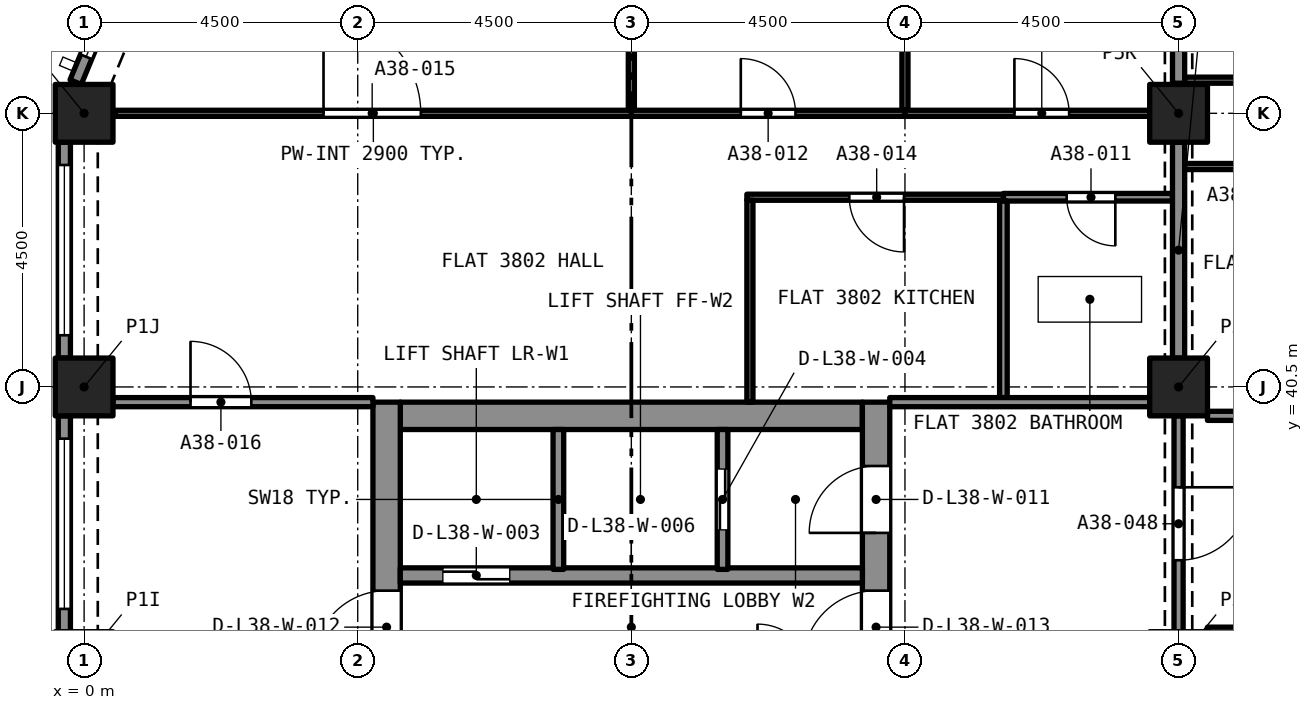
"""IFC4 building model, lengths in metres.
Left out: names, types, materials, properties, quantities, classifications, styles, units other than length and angle.
Written with IfcOpenShell. Run it as: python <this file> out.ifc"""

import sys

from ifc_helpers import new_model, si_unit, direction, frame, frame_2d, origin, origin_2d, place, context, subcontext, project, spatial, rectangle, extrude, element, fill, save


model = new_model("IFC4")
c1 = context("Model", 3, precision=1e-05, world=origin(), true_north=direction((0.0, 1.0)))
c2 = subcontext(c1, "Body", "Model", "MODEL_VIEW")
j1 = project(units=[si_unit("LENGTHUNIT", "METRE"), si_unit("PLANEANGLEUNIT", "RADIAN")], contexts=[c1])
p1 = place(None, origin())
s1 = spatial("IfcSite", under=j1, at=p1, CompositionType="ELEMENT")
p2 = place(p1, origin())
s2 = spatial("IfcBuilding", under=s1, at=p2, CompositionType="ELEMENT")
p3 = place(p2, frame((0.0, 0.0, 136.6)))
s3 = spatial("IfcBuildingStorey", under=s2, at=p3, CompositionType="ELEMENT", Elevation=136.6)
for number, where, z_axis, x_axis in (
    (1, (0.0, 40.5, 0.0), (0.0, 0.0, 1.0), (1.0, 0.0, 0.0)),
    (2, (18.0, 40.5, 0.0), (0.0, 0.0, 1.0), (1.0, 0.0, 0.0)),
    (3, (0.0, 45.0, 0.0), (0.0, 0.0, 1.0), (1.0, 0.0, 0.0)),
    (4, (18.0, 45.0, 0.0), (0.0, 0.0, 1.0), (1.0, 0.0, 0.0)),
):
    element("IfcColumn", number, at=place(p3, frame(where, z_axis=z_axis, x_axis=x_axis)), inside=s3, PredefinedType="COLUMN", context=c2, shape_type="SweptSolid", body=[
        extrude(rectangle(XDim=0.95, YDim=0.95, at=origin_2d()), origin(), (0.0, 0.0, 1.0), 3.2),
    ])
p4 = place(p3, frame((5.2, 40.025, 0.0), z_axis=(0.0, 0.0, 1.0), x_axis=(1.0, 0.0, 0.0)))
e5 = element("IfcWall", 5, at=p4, inside=s3, PredefinedType="SOLIDWALL", context=c2, shape_type="SweptSolid", body=[
    extrude(rectangle(XDim=7.6, YDim=0.45, at=frame_2d((3.8, 0.0))), origin(), (0.0, 0.0, 1.0), 3.2),
])
p5 = place(p3, frame((4.975, 27.25, 0.0), z_axis=(0.0, 0.0, 1.0), x_axis=(0.0, 1.0, 0.0)))
e6 = element("IfcWall", 6, at=p5, inside=s3, PredefinedType="SOLIDWALL", context=c2, shape_type="SweptSolid", body=[
    extrude(rectangle(XDim=13.0, YDim=0.45, at=frame_2d((6.5, 0.0))), origin(), (0.0, 0.0, 1.0), 3.2),
])
p6 = place(p5, frame((8.7, 0.0, 0.0)))
e7 = element("IfcOpeningElement", 7, at=p6, cuts=e6, PredefinedType="OPENING", context=c2, shape_type="SweptSolid", body=[
    extrude(rectangle(XDim=1.2, YDim=2.1, at=frame_2d((0.6, 1.05))), frame((0.0, 0.235, 0.0), z_axis=(0.0, -1.0, 0.0), x_axis=(1.0, 0.0, 0.0)), (0.0, 0.0, 1.0), 0.47),
])
p7 = place(p3, frame((13.025, 27.25, 0.0), z_axis=(0.0, 0.0, 1.0), x_axis=(0.0, 1.0, 0.0)))
e8 = element("IfcWall", 8, at=p7, inside=s3, PredefinedType="SOLIDWALL", context=c2, shape_type="SweptSolid", body=[
    extrude(rectangle(XDim=13.0, YDim=0.45, at=frame_2d((6.5, 0.0))), origin(), (0.0, 0.0, 1.0), 3.2),
])
p8 = place(p7, frame((10.85, 0.0, 0.0)))
e9 = element("IfcOpeningElement", 9, at=p8, cuts=e8, PredefinedType="OPENING", context=c2, shape_type="SweptSolid", body=[
    extrude(rectangle(XDim=1.1, YDim=2.1, at=frame_2d((0.55, 1.05))), frame((0.0, 0.235, 0.0), z_axis=(0.0, -1.0, 0.0), x_axis=(1.0, 0.0, 0.0)), (0.0, 0.0, 1.0), 0.47),
])
p9 = place(p7, frame((8.7, 0.0, 0.0)))
e10 = element("IfcOpeningElement", 10, at=p9, cuts=e8, PredefinedType="OPENING", context=c2, shape_type="SweptSolid", body=[
    extrude(rectangle(XDim=1.2, YDim=2.1, at=frame_2d((0.6, 1.05))), frame((0.0, 0.235, 0.0), z_axis=(0.0, -1.0, 0.0), x_axis=(1.0, 0.0, 0.0)), (0.0, 0.0, 1.0), 0.47),
])
p10 = place(p3, frame((-0.139, 45.513, 0.0), z_axis=(0.0, 0.0, 1.0), x_axis=(0.382680855588, 0.923880599843, 0.0)))
e11 = element("IfcWall", 11, at=p10, inside=s3, PredefinedType="SOLIDWALL", context=c2, shape_type="SweptSolid", body=[
    extrude(rectangle(XDim=2.403, YDim=0.2, at=frame_2d((1.201, 0.0))), origin(), (0.0, 0.0, 1.0), 3.2),
])
p11 = place(p10, frame((0.451, 0.0, 0.45)))
e12 = element("IfcOpeningElement", 12, at=p11, cuts=e11, PredefinedType="OPENING", context=c2, shape_type="SweptSolid", body=[
    extrude(rectangle(XDim=1.7, YDim=1.95, at=frame_2d((0.85, 0.975))), frame((0.0, 0.11, 0.0), z_axis=(0.0, -1.0, 0.0), x_axis=(1.0, 0.0, 0.0)), (0.0, 0.0, 1.0), 0.22),
])
p12 = place(p3, frame((-0.325, 40.975, 0.0), z_axis=(0.0, 0.0, 1.0), x_axis=(0.0, 1.0, 0.0)))
e13 = element("IfcWall", 13, at=p12, inside=s3, PredefinedType="SOLIDWALL", context=c2, shape_type="SweptSolid", body=[
    extrude(rectangle(XDim=3.55, YDim=0.2, at=frame_2d((1.775, 0.0))), origin(), (0.0, 0.0, 1.0), 3.2),
])
p13 = place(p12, frame((0.375, 0.0, 0.45)))
e14 = element("IfcOpeningElement", 14, at=p13, cuts=e13, PredefinedType="OPENING", context=c2, shape_type="SweptSolid", body=[
    extrude(rectangle(XDim=2.8, YDim=1.95, at=frame_2d((1.4, 0.975))), frame((0.0, 0.11, 0.0), z_axis=(0.0, -1.0, 0.0), x_axis=(1.0, 0.0, 0.0)), (0.0, 0.0, 1.0), 0.22),
])
p14 = place(p3, frame((-0.325, 36.475, 0.0), z_axis=(0.0, 0.0, 1.0), x_axis=(0.0, 1.0, 0.0)))
e15 = element("IfcWall", 15, at=p14, inside=s3, PredefinedType="SOLIDWALL", context=c2, shape_type="SweptSolid", body=[
    extrude(rectangle(XDim=3.55, YDim=0.2, at=frame_2d((1.775, 0.0))), origin(), (0.0, 0.0, 1.0), 3.2),
])
p15 = place(p14, frame((0.375, 0.0, 0.45)))
e16 = element("IfcOpeningElement", 16, at=p15, cuts=e15, PredefinedType="OPENING", context=c2, shape_type="SweptSolid", body=[
    extrude(rectangle(XDim=2.8, YDim=1.95, at=frame_2d((1.4, 0.975))), frame((0.0, 0.11, 0.0), z_axis=(0.0, -1.0, 0.0), x_axis=(1.0, 0.0, 0.0)), (0.0, 0.0, 1.0), 0.22),
])
p16 = place(p3, frame((17.9, 43.62, 0.0), z_axis=(0.0, 0.0, 1.0), x_axis=(-1.0, 0.0, 0.0)))
e17 = element("IfcWall", 17, at=p16, inside=s3, PredefinedType="PARTITIONING", context=c2, shape_type="SweptSolid", body=[
    extrude(rectangle(XDim=2.781, YDim=0.125, at=frame_2d((1.39, 0.0))), origin(), (0.0, 0.0, 1.0), 2.9),
])
p17 = place(p16, frame((0.94, 0.0, 0.0)))
e18 = element("IfcOpeningElement", 18, at=p17, cuts=e17, PredefinedType="OPENING", context=c2, shape_type="SweptSolid", body=[
    extrude(rectangle(XDim=0.8, YDim=2.1, at=frame_2d((0.4, 1.05))), frame((0.0, 0.073, 0.0), z_axis=(0.0, -1.0, 0.0), x_axis=(1.0, 0.0, 0.0)), (0.0, 0.0, 1.0), 0.145),
])
p18 = place(p3, frame((15.119, 40.325, 0.0), z_axis=(0.0, 0.0, 1.0), x_axis=(0.0, 1.0, 0.0)))
e19 = element("IfcWall", 19, at=p18, inside=s3, PredefinedType="PARTITIONING", context=c2, shape_type="SweptSolid", body=[
    extrude(rectangle(XDim=3.233, YDim=0.125, at=frame_2d((1.616, 0.0))), origin(), (0.0, 0.0, 1.0), 2.9),
])
p19 = place(p3, frame((18.0, 40.975, 0.0), z_axis=(0.0, 0.0, 1.0), x_axis=(0.0, 1.0, 0.0)))
e20 = element("IfcWall", 20, at=p19, inside=s3, PredefinedType="PARTITIONING", context=c2, shape_type="SweptSolid", body=[
    extrude(rectangle(XDim=3.55, YDim=0.2, at=frame_2d((1.775, 0.0))), origin(), (0.0, 0.0, 1.0), 2.38),
])
p20 = place(p3, frame((13.5, 45.05, 0.0), z_axis=(0.0, 0.0, 1.0), x_axis=(0.0, 1.0, 0.0)))
e21 = element("IfcWall", 21, at=p20, inside=s3, PredefinedType="PARTITIONING", context=c2, shape_type="SweptSolid", body=[
    extrude(rectangle(XDim=3.975, YDim=0.1, at=frame_2d((1.987, 0.0))), origin(), (0.0, 0.0, 1.0), 2.9),
])
p21 = place(p3, frame((9.0, 45.0, 0.0), z_axis=(0.0, 0.0, 1.0), x_axis=(1.0, 0.0, 0.0)))
e22 = element("IfcWall", 22, at=p21, inside=s3, PredefinedType="PARTITIONING", context=c2, shape_type="SweptSolid", body=[
    extrude(rectangle(XDim=4.5, YDim=0.1, at=frame_2d((2.25, 0.0))), origin(), (0.0, 0.0, 1.0), 2.9),
])
p22 = place(p21, frame((1.8, 0.0, 0.0)))
e23 = element("IfcOpeningElement", 23, at=p22, cuts=e22, PredefinedType="OPENING", context=c2, shape_type="SweptSolid", body=[
    extrude(rectangle(XDim=0.9, YDim=2.1, at=frame_2d((0.45, 1.05))), frame((0.0, 0.06, 0.0), z_axis=(0.0, -1.0, 0.0), x_axis=(1.0, 0.0, 0.0)), (0.0, 0.0, 1.0), 0.12),
])
p23 = place(p3, frame((9.0, 45.05, 0.0), z_axis=(0.0, 0.0, 1.0), x_axis=(0.0, 1.0, 0.0)))
e24 = element("IfcWall", 24, at=p23, inside=s3, PredefinedType="PARTITIONING", context=c2, shape_type="SweptSolid", body=[
    extrude(rectangle(XDim=3.975, YDim=0.1, at=frame_2d((1.987, 0.0))), origin(), (0.0, 0.0, 1.0), 2.9),
])
p24 = place(p3, frame((13.5, 45.0, 0.0), z_axis=(0.0, 0.0, 1.0), x_axis=(1.0, 0.0, 0.0)))
e25 = element("IfcWall", 25, at=p24, inside=s3, PredefinedType="PARTITIONING", context=c2, shape_type="SweptSolid", body=[
    extrude(rectangle(XDim=4.025, YDim=0.1, at=frame_2d((2.012, 0.0))), origin(), (0.0, 0.0, 1.0), 2.9),
])
p25 = place(p24, frame((1.8, 0.0, 0.0)))
e26 = element("IfcOpeningElement", 26, at=p25, cuts=e25, PredefinedType="OPENING", context=c2, shape_type="SweptSolid", body=[
    extrude(rectangle(XDim=0.9, YDim=2.1, at=frame_2d((0.45, 1.05))), frame((0.0, 0.06, 0.0), z_axis=(0.0, -1.0, 0.0), x_axis=(1.0, 0.0, 0.0)), (0.0, 0.0, 1.0), 0.12),
])
p26 = place(p3, frame((18.0, 45.495, 0.0), z_axis=(0.0, 0.0, 1.0), x_axis=(0.0, 1.0, 0.0)))
e27 = element("IfcWall", 27, at=p26, inside=s3, PredefinedType="PARTITIONING", context=c2, shape_type="SweptSolid", body=[
    extrude(rectangle(XDim=3.53, YDim=0.2, at=frame_2d((1.765, 0.0))), origin(), (0.0, 0.0, 1.0), 2.38),
])
p27 = place(p3, frame((15.119, 43.62, 0.0), z_axis=(0.0, 0.0, 1.0), x_axis=(-1.0, 0.0, 0.0)))
e28 = element("IfcWall", 28, at=p27, inside=s3, PredefinedType="PARTITIONING", context=c2, shape_type="SweptSolid", body=[
    extrude(rectangle(XDim=4.219, YDim=0.1, at=frame_2d((2.11, 0.0))), origin(), (0.0, 0.0, 1.0), 2.9),
])
p28 = place(p27, frame((1.635, 0.0, 0.0)))
e29 = element("IfcOpeningElement", 29, at=p28, cuts=e28, PredefinedType="OPENING", context=c2, shape_type="SweptSolid", body=[
    extrude(rectangle(XDim=0.9, YDim=2.1, at=frame_2d((0.45, 1.05))), frame((0.0, 0.06, 0.0), z_axis=(0.0, -1.0, 0.0), x_axis=(1.0, 0.0, 0.0)), (0.0, 0.0, 1.0), 0.12),
])
p29 = place(p3, frame((10.95, 40.25, 0.0), z_axis=(0.0, 0.0, 1.0), x_axis=(0.0, 1.0, 0.0)))
e30 = element("IfcWall", 30, at=p29, inside=s3, PredefinedType="PARTITIONING", context=c2, shape_type="SweptSolid", body=[
    extrude(rectangle(XDim=3.32, YDim=0.1, at=frame_2d((1.66, 0.0))), origin(), (0.0, 0.0, 1.0), 2.9),
])
p30 = place(p3, frame((0.514, 45.0, 0.0), z_axis=(0.0, 0.0, 1.0), x_axis=(1.0, 0.0, 0.0)))
e31 = element("IfcWall", 31, at=p30, inside=s3, PredefinedType="PARTITIONING", context=c2, shape_type="SweptSolid", body=[
    extrude(rectangle(XDim=8.486, YDim=0.1, at=frame_2d((4.243, 0.0))), origin(), (0.0, 0.0, 1.0), 2.9),
])
p31 = place(p30, frame((3.423, 0.0, 0.0)))
e32 = element("IfcOpeningElement", 32, at=p31, cuts=e31, PredefinedType="OPENING", context=c2, shape_type="SweptSolid", body=[
    extrude(rectangle(XDim=1.6, YDim=2.1, at=frame_2d((0.8, 1.05))), frame((0.0, 0.06, 0.0), z_axis=(0.0, -1.0, 0.0), x_axis=(1.0, 0.0, 0.0)), (0.0, 0.0, 1.0), 0.12),
])
p32 = place(p3, frame((0.475, 40.25, 0.0), z_axis=(0.0, 0.0, 1.0), x_axis=(1.0, 0.0, 0.0)))
e33 = element("IfcWall", 33, at=p32, inside=s3, PredefinedType="PARTITIONING", context=c2, shape_type="SweptSolid", body=[
    extrude(rectangle(XDim=4.275, YDim=0.15, at=frame_2d((2.137, 0.0))), origin(), (0.0, 0.0, 1.0), 2.9),
])
p33 = place(p32, frame((1.275, 0.0, 0.0)))
e34 = element("IfcOpeningElement", 34, at=p33, cuts=e33, PredefinedType="OPENING", context=c2, shape_type="SweptSolid", body=[
    extrude(rectangle(XDim=1.0, YDim=2.1, at=frame_2d((0.5, 1.05))), frame((0.0, 0.085, 0.0), z_axis=(0.0, -1.0, 0.0), x_axis=(1.0, 0.0, 0.0)), (0.0, 0.0, 1.0), 0.17),
])
p34 = place(p3, frame((13.25, 40.25, 0.0), z_axis=(0.0, 0.0, 1.0), x_axis=(1.0, 0.0, 0.0)))
e35 = element("IfcWall", 35, at=p34, inside=s3, PredefinedType="PARTITIONING", context=c2, shape_type="SweptSolid", body=[
    extrude(rectangle(XDim=4.275, YDim=0.15, at=frame_2d((2.137, 0.0))), origin(), (0.0, 0.0, 1.0), 2.9),
])
p35 = place(p3, frame((21.24, 44.125, 0.0), z_axis=(0.0, 0.0, 1.0), x_axis=(-1.0, 0.0, 0.0)))
e36 = element("IfcWall", 36, at=p35, inside=s3, PredefinedType="PARTITIONING", context=c2, shape_type="SweptSolid", body=[
    extrude(rectangle(XDim=3.14, YDim=0.1, at=frame_2d((1.57, 0.0))), origin(), (0.0, 0.0, 1.0), 2.75),
])
p36 = place(p35, frame((1.17, 0.0, 0.0)))
e37 = element("IfcOpeningElement", 37, at=p36, cuts=e36, PredefinedType="OPENING", context=c2, shape_type="SweptSolid", body=[
    extrude(rectangle(XDim=0.9, YDim=2.1, at=frame_2d((0.45, 1.05))), frame((0.0, 0.06, 0.0), z_axis=(0.0, -1.0, 0.0), x_axis=(1.0, 0.0, 0.0)), (0.0, 0.0, 1.0), 0.12),
])
p37 = place(p3, frame((18.1, 45.545, 0.0), z_axis=(0.0, 0.0, 1.0), x_axis=(1.0, 0.0, 0.0)))
e38 = element("IfcWall", 38, at=p37, inside=s3, PredefinedType="PARTITIONING", context=c2, shape_type="SweptSolid", body=[
    extrude(rectangle(XDim=4.4, YDim=0.1, at=frame_2d((2.2, 0.0))), origin(), (0.0, 0.0, 1.0), 2.75),
])
p38 = place(p37, frame((1.65, 0.0, 0.0)))
e39 = element("IfcOpeningElement", 39, at=p38, cuts=e38, PredefinedType="OPENING", context=c2, shape_type="SweptSolid", body=[
    extrude(rectangle(XDim=1.0, YDim=2.1, at=frame_2d((0.5, 1.05))), frame((0.0, 0.06, 0.0), z_axis=(0.0, -1.0, 0.0), x_axis=(1.0, 0.0, 0.0)), (0.0, 0.0, 1.0), 0.12),
])
p39 = place(p3, frame((18.475, 40.025, 0.0), z_axis=(0.0, 0.0, 1.0), x_axis=(1.0, 0.0, 0.0)))
e40 = element("IfcWall", 40, at=p39, inside=s3, PredefinedType="PARTITIONING", context=c2, shape_type="SweptSolid", body=[
    extrude(rectangle(XDim=9.05, YDim=0.15, at=frame_2d((4.525, 0.0))), origin(), (0.0, 0.0, 1.0), 2.75),
])
p40 = place(p3, frame((31.025, 36.475, 0.0), z_axis=(0.0, 0.0, 1.0), x_axis=(-1.0, 0.0, 0.0)))
e41 = element("IfcWall", 41, at=p40, inside=s3, PredefinedType="PARTITIONING", context=c2, shape_type="SweptSolid", body=[
    extrude(rectangle(XDim=12.55, YDim=0.15, at=frame_2d((6.275, 0.0))), origin(), (0.0, 0.0, 1.0), 2.75),
])
p41 = place(p40, frame((5.775, 0.0, 0.0)))
e42 = element("IfcOpeningElement", 42, at=p41, cuts=e41, PredefinedType="OPENING", context=c2, shape_type="SweptSolid", body=[
    extrude(rectangle(XDim=1.0, YDim=2.1, at=frame_2d((0.5, 1.05))), frame((0.0, 0.085, 0.0), z_axis=(0.0, -1.0, 0.0), x_axis=(1.0, 0.0, 0.0)), (0.0, 0.0, 1.0), 0.17),
])
p42 = place(p3, frame((18.0, 40.025, 0.0), z_axis=(0.0, 0.0, 1.0), x_axis=(0.0, -1.0, 0.0)))
e43 = element("IfcWall", 43, at=p42, inside=s3, PredefinedType="PARTITIONING", context=c2, shape_type="SweptSolid", body=[
    extrude(rectangle(XDim=3.55, YDim=0.15, at=frame_2d((1.775, 0.0))), origin(), (0.0, 0.0, 1.0), 2.38),
])
p43 = place(p42, frame((1.175, 0.0, 0.0)))
e44 = element("IfcOpeningElement", 44, at=p43, cuts=e43, PredefinedType="OPENING", context=c2, shape_type="SweptSolid", body=[
    extrude(rectangle(XDim=1.2, YDim=2.1, at=frame_2d((0.6, 1.05))), frame((0.0, 0.085, 0.0), z_axis=(0.0, -1.0, 0.0), x_axis=(1.0, 0.0, 0.0)), (0.0, 0.0, 1.0), 0.17),
])
p44 = place(p3, frame((5.2, 37.4, 0.0), z_axis=(0.0, 0.0, 1.0), x_axis=(1.0, 0.0, 0.0)))
e45 = element("IfcWall", 45, at=p44, inside=s3, PredefinedType="SOLIDWALL", context=c2, shape_type="SweptSolid", body=[
    extrude(rectangle(XDim=7.6, YDim=0.25, at=frame_2d((3.8, 0.0))), origin(), (0.0, 0.0, 1.0), 2.9),
])
p45 = place(p44, frame((0.7, 0.0, 0.0)))
e46 = element("IfcOpeningElement", 46, at=p45, cuts=e45, PredefinedType="OPENING", context=c2, shape_type="SweptSolid", body=[
    extrude(rectangle(XDim=1.1, YDim=2.4, at=frame_2d((0.55, 1.2))), frame((0.0, 0.135, 0.0), z_axis=(0.0, -1.0, 0.0), x_axis=(1.0, 0.0, 0.0)), (0.0, 0.0, 1.0), 0.27),
])
p46 = place(p3, frame((7.8, 37.5, 0.0), z_axis=(0.0, 0.0, 1.0), x_axis=(0.0, 1.0, 0.0)))
e47 = element("IfcWall", 47, at=p46, inside=s3, PredefinedType="SOLIDWALL", context=c2, shape_type="SweptSolid", body=[
    extrude(rectangle(XDim=2.3, YDim=0.175, at=frame_2d((1.15, 0.0))), origin(), (0.0, 0.0, 1.0), 2.9),
])
p47 = place(p3, frame((10.5, 37.5, 0.0), z_axis=(0.0, 0.0, 1.0), x_axis=(0.0, 1.0, 0.0)))
e48 = element("IfcWall", 48, at=p47, inside=s3, PredefinedType="SOLIDWALL", context=c2, shape_type="SweptSolid", body=[
    extrude(rectangle(XDim=2.3, YDim=0.175, at=frame_2d((1.15, 0.0))), origin(), (0.0, 0.0, 1.0), 2.9),
])
p48 = place(p47, frame((0.65, 0.0, 0.0)))
e49 = element("IfcOpeningElement", 49, at=p48, cuts=e48, PredefinedType="OPENING", context=c2, shape_type="SweptSolid", body=[
    extrude(rectangle(XDim=1.0, YDim=2.1, at=frame_2d((0.5, 1.05))), frame((0.0, 0.097, 0.0), z_axis=(0.0, -1.0, 0.0), x_axis=(1.0, 0.0, 0.0)), (0.0, 0.0, 1.0), 0.195),
])
p49 = place(p11, origin())
e50 = element("IfcWindow", 50, at=p49, inside=s3, PartitioningType="SINGLE_PANEL", PredefinedType="WINDOW", context=c2, shape_type="SweptSolid", body=[
    extrude(rectangle(XDim=1.7, YDim=1.95, at=frame_2d((0.85, 0.975))), frame((0.0, 0.03, 0.0), z_axis=(0.0, -1.0, 0.0), x_axis=(1.0, 0.0, 0.0)), (0.0, 0.0, 1.0), 0.06),
])
fill(e12, e50)
p50 = place(p13, origin())
e51 = element("IfcWindow", 51, at=p50, inside=s3, PartitioningType="SINGLE_PANEL", PredefinedType="WINDOW", context=c2, shape_type="SweptSolid", body=[
    extrude(rectangle(XDim=2.8, YDim=1.95, at=frame_2d((1.4, 0.975))), frame((0.0, 0.03, 0.0), z_axis=(0.0, -1.0, 0.0), x_axis=(1.0, 0.0, 0.0)), (0.0, 0.0, 1.0), 0.06),
])
fill(e14, e51)
p51 = place(p15, origin())
e52 = element("IfcWindow", 52, at=p51, inside=s3, PartitioningType="SINGLE_PANEL", PredefinedType="WINDOW", context=c2, shape_type="SweptSolid", body=[
    extrude(rectangle(XDim=2.8, YDim=1.95, at=frame_2d((1.4, 0.975))), frame((0.0, 0.03, 0.0), z_axis=(0.0, -1.0, 0.0), x_axis=(1.0, 0.0, 0.0)), (0.0, 0.0, 1.0), 0.06),
])
fill(e16, e52)
p52 = place(p17, origin())
e53 = element("IfcDoor", 53, at=p52, inside=s3, OperationType="SINGLE_SWING_LEFT", PredefinedType="DOOR", context=c2, shape_type="SweptSolid", body=[
    extrude(rectangle(XDim=0.8, YDim=2.1, at=frame_2d((0.4, 1.05))), frame((0.0, 0.025, 0.0), z_axis=(0.0, -1.0, 0.0), x_axis=(1.0, 0.0, 0.0)), (0.0, 0.0, 1.0), 0.05),
])
fill(e18, e53)
p53 = place(p22, origin())
e54 = element("IfcDoor", 54, at=p53, inside=s3, OperationType="SINGLE_SWING_LEFT", PredefinedType="DOOR", context=c2, shape_type="SweptSolid", body=[
    extrude(rectangle(XDim=0.9, YDim=2.1, at=frame_2d((0.45, 1.05))), frame((0.0, 0.025, 0.0), z_axis=(0.0, -1.0, 0.0), x_axis=(1.0, 0.0, 0.0)), (0.0, 0.0, 1.0), 0.05),
])
fill(e23, e54)
p54 = place(p25, origin())
e55 = element("IfcDoor", 55, at=p54, inside=s3, OperationType="SINGLE_SWING_RIGHT", PredefinedType="DOOR", context=c2, shape_type="SweptSolid", body=[
    extrude(rectangle(XDim=0.9, YDim=2.1, at=frame_2d((0.45, 1.05))), frame((0.0, 0.025, 0.0), z_axis=(0.0, -1.0, 0.0), x_axis=(1.0, 0.0, 0.0)), (0.0, 0.0, 1.0), 0.05),
])
fill(e26, e55)
p55 = place(p28, origin())
e56 = element("IfcDoor", 56, at=p55, inside=s3, OperationType="SINGLE_SWING_LEFT", PredefinedType="DOOR", context=c2, shape_type="SweptSolid", body=[
    extrude(rectangle(XDim=0.9, YDim=2.1, at=frame_2d((0.45, 1.05))), frame((0.0, 0.025, 0.0), z_axis=(0.0, -1.0, 0.0), x_axis=(1.0, 0.0, 0.0)), (0.0, 0.0, 1.0), 0.05),
])
fill(e29, e56)
p56 = place(p31, origin())
e57 = element("IfcDoor", 57, at=p56, inside=s3, OperationType="SINGLE_SWING_LEFT", PredefinedType="DOOR", context=c2, shape_type="SweptSolid", body=[
    extrude(rectangle(XDim=1.6, YDim=2.1, at=frame_2d((0.8, 1.05))), frame((0.0, 0.025, 0.0), z_axis=(0.0, -1.0, 0.0), x_axis=(1.0, 0.0, 0.0)), (0.0, 0.0, 1.0), 0.05),
])
fill(e32, e57)
p57 = place(p33, origin())
e58 = element("IfcDoor", 58, at=p57, inside=s3, OperationType="SINGLE_SWING_LEFT", PredefinedType="DOOR", context=c2, shape_type="SweptSolid", body=[
    extrude(rectangle(XDim=1.0, YDim=2.1, at=frame_2d((0.5, 1.05))), frame((0.0, 0.025, 0.0), z_axis=(0.0, -1.0, 0.0), x_axis=(1.0, 0.0, 0.0)), (0.0, 0.0, 1.0), 0.05),
])
fill(e34, e58)
p58 = place(p43, origin())
e59 = element("IfcDoor", 59, at=p58, inside=s3, OperationType="SINGLE_SWING_LEFT", PredefinedType="DOOR", context=c2, shape_type="SweptSolid", body=[
    extrude(rectangle(XDim=1.2, YDim=2.1, at=frame_2d((0.6, 1.05))), frame((0.0, 0.025, 0.0), z_axis=(0.0, -1.0, 0.0), x_axis=(1.0, 0.0, 0.0)), (0.0, 0.0, 1.0), 0.05),
])
fill(e44, e59)
p59 = place(p45, origin())
e60 = element("IfcDoor", 60, at=p59, inside=s3, OperationType="SLIDING_TO_LEFT", PredefinedType="DOOR", context=c2, shape_type="SweptSolid", body=[
    extrude(rectangle(XDim=1.1, YDim=2.4, at=frame_2d((0.55, 1.2))), frame((0.0, 0.025, 0.0), z_axis=(0.0, -1.0, 0.0), x_axis=(1.0, 0.0, 0.0)), (0.0, 0.0, 1.0), 0.05),
])
fill(e46, e60)
p60 = place(p48, origin())
e61 = element("IfcDoor", 61, at=p60, inside=s3, OperationType="SLIDING_TO_LEFT", PredefinedType="DOOR", context=c2, shape_type="SweptSolid", body=[
    extrude(rectangle(XDim=1.0, YDim=2.1, at=frame_2d((0.5, 1.05))), frame((0.0, 0.025, 0.0), z_axis=(0.0, -1.0, 0.0), x_axis=(1.0, 0.0, 0.0)), (0.0, 0.0, 1.0), 0.05),
])
fill(e49, e61)
p61 = place(p8, origin())
e62 = element("IfcDoor", 62, at=p61, inside=s3, OperationType="SINGLE_SWING_LEFT", PredefinedType="DOOR", context=c2, shape_type="SweptSolid", body=[
    extrude(rectangle(XDim=1.1, YDim=2.1, at=frame_2d((0.55, 1.05))), frame((0.0, 0.025, 0.0), z_axis=(0.0, -1.0, 0.0), x_axis=(1.0, 0.0, 0.0)), (0.0, 0.0, 1.0), 0.05),
])
fill(e9, e62)
p62 = place(p6, origin())
e63 = element("IfcDoor", 63, at=p62, inside=s3, OperationType="SINGLE_SWING_LEFT", PredefinedType="DOOR", context=c2, shape_type="SweptSolid", body=[
    extrude(rectangle(XDim=1.2, YDim=2.1, at=frame_2d((0.6, 1.05))), frame((0.0, 0.025, 0.0), z_axis=(0.0, -1.0, 0.0), x_axis=(1.0, 0.0, 0.0)), (0.0, 0.0, 1.0), 0.05),
])
fill(e7, e63)
p63 = place(p9, origin())
e64 = element("IfcDoor", 64, at=p63, inside=s3, OperationType="SINGLE_SWING_LEFT", PredefinedType="DOOR", context=c2, shape_type="SweptSolid", body=[
    extrude(rectangle(XDim=1.2, YDim=2.1, at=frame_2d((0.6, 1.05))), frame((0.0, 0.025, 0.0), z_axis=(0.0, -1.0, 0.0), x_axis=(1.0, 0.0, 0.0)), (0.0, 0.0, 1.0), 0.05),
])
fill(e10, e64)
save(model, sys.argv[1])
